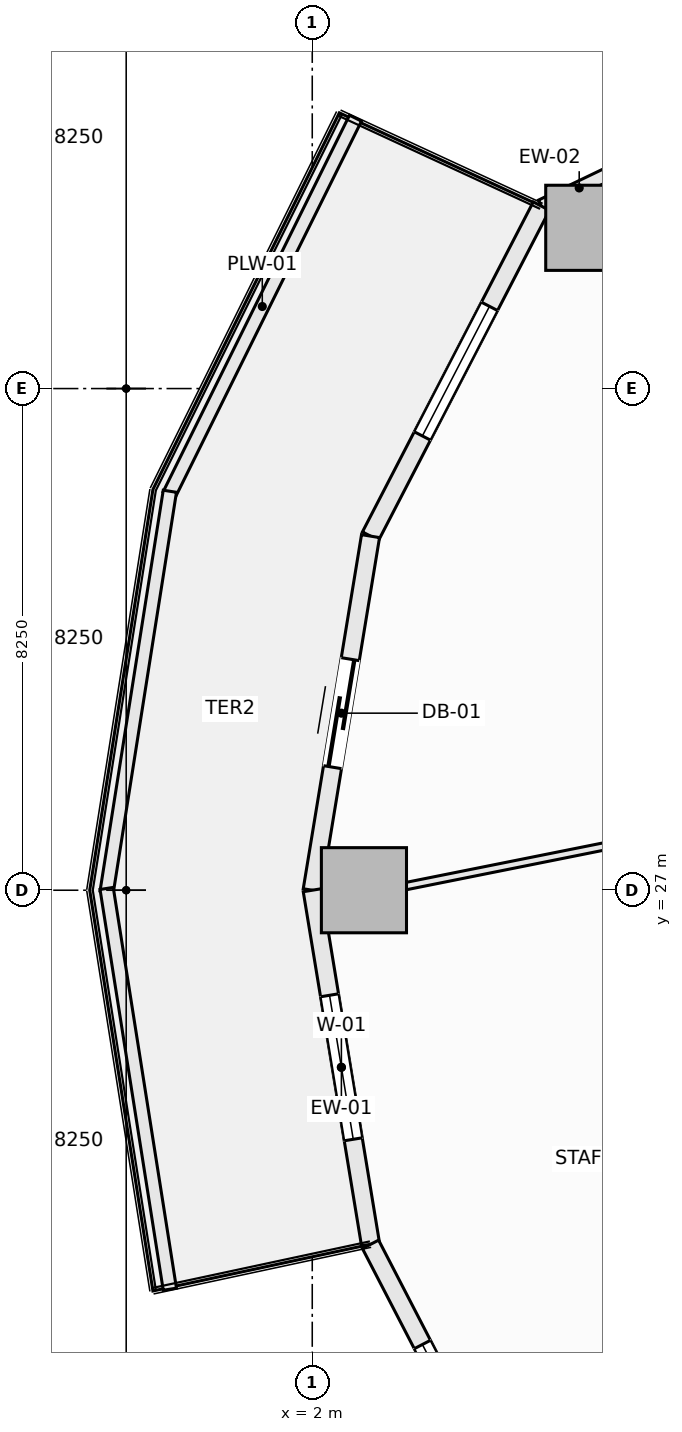
"""IFC4 building model, lengths in metres.
Left out: names, types, materials, properties, quantities, classifications, styles, units other than length and angle.
Written with IfcOpenShell. Run it as: python <this file> out.ifc"""

import sys

from ifc_helpers import new_model, si_unit, direction, frame, frame_2d, origin, origin_2d, place, context, subcontext, project, spatial, rectangle, extrude, element, fill, save


model = new_model("IFC4")
c1 = context("Model", 3, precision=1e-05, world=origin(), true_north=direction((0.0, 1.0)))
c2 = subcontext(c1, "Body", "Model", "MODEL_VIEW")
j1 = project(units=[si_unit("LENGTHUNIT", "METRE"), si_unit("PLANEANGLEUNIT", "RADIAN")], contexts=[c1])
p1 = place(None, origin())
s1 = spatial("IfcSite", under=j1, at=p1, CompositionType="ELEMENT")
p2 = place(p1, origin())
s2 = spatial("IfcBuilding", under=s1, at=p2, CompositionType="ELEMENT")
p3 = place(p2, frame((0.0, 0.0, 45.75)))
s3 = spatial("IfcBuildingStorey", under=s2, at=p3, CompositionType="ELEMENT", Elevation=45.75)
for number, where, z_axis, x_axis in (
    (1, (6.54, 37.894, -0.28), (0.0, 0.0, 1.0), (1.0, 0.0, 0.0)),
    (2, (2.85, 27.0, -0.28), (0.0, 0.0, 1.0), (1.0, 0.0, 0.0)),
):
    element("IfcColumn", number, at=place(p3, frame(where, z_axis=z_axis, x_axis=x_axis)), inside=s3, PredefinedType="COLUMN", context=c2, shape_type="SweptSolid", body=[
        extrude(rectangle(XDim=1.4, YDim=1.4, at=origin_2d()), origin(), (0.0, 0.0, 1.0), 3.85),
    ])
p4 = place(p3, frame((5.768, 38.25, 0.0), z_axis=(0.0, 0.0, 1.0), x_axis=(0.90131879969, 0.433156347438, 0.0)))
e3 = element("IfcWall", 3, at=p4, inside=s3, PredefinedType="SOLIDWALL", context=c2, shape_type="SweptSolid", body=[
    extrude(rectangle(XDim=1.381, YDim=0.22, at=frame_2d((0.69, 0.0))), origin(), (0.0, 0.0, 1.0), 3.093),
])
p5 = place(p3, frame((2.958, 32.823, 0.0), z_axis=(0.0, 0.0, 1.0), x_axis=(0.459809804413, 0.88801742312, 0.0)))
e4 = element("IfcWall", 4, at=p5, inside=s3, PredefinedType="SOLIDWALL", context=c2, shape_type="SweptSolid", body=[
    extrude(rectangle(XDim=6.111, YDim=0.3, at=frame_2d((3.055, 0.0))), origin(), (0.0, 0.0, 1.0), 3.093),
])
p6 = place(p5, frame((1.855, 0.0, 0.85)))
e5 = element("IfcOpeningElement", 5, at=p6, cuts=e4, PredefinedType="OPENING", context=c2, shape_type="SweptSolid", body=[
    extrude(rectangle(XDim=2.4, YDim=1.9, at=frame_2d((1.2, 0.95))), frame((0.0, 0.16, 0.0), z_axis=(0.0, -1.0, 0.0), x_axis=(1.0, 0.0, 0.0)), (0.0, 0.0, 1.0), 0.32),
])
p7 = place(p3, frame((2.0, 27.0, 0.0), z_axis=(0.0, 0.0, 1.0), x_axis=(0.162366057843, 0.98673059305, 0.0)))
e6 = element("IfcWall", 6, at=p7, inside=s3, PredefinedType="SOLIDWALL", context=c2, shape_type="SweptSolid", body=[
    extrude(rectangle(XDim=5.902, YDim=0.3, at=frame_2d((2.951, 0.0))), origin(), (0.0, 0.0, 1.0), 3.093),
])
p8 = place(p7, frame((2.051, 0.0, 0.0)))
e7 = element("IfcOpeningElement", 7, at=p8, cuts=e6, PredefinedType="OPENING", context=c2, shape_type="SweptSolid", body=[
    extrude(rectangle(XDim=1.8, YDim=2.25, at=frame_2d((0.9, 1.125))), frame((0.0, 0.16, 0.0), z_axis=(0.0, -1.0, 0.0), x_axis=(1.0, 0.0, 0.0)), (0.0, 0.0, 1.0), 0.32),
])
p9 = place(p3, frame((2.0, 27.0, 0.0), z_axis=(0.0, 0.0, 1.0), x_axis=(0.162366057843, -0.98673059305, 0.0)))
e8 = element("IfcWall", 8, at=p9, inside=s3, PredefinedType="SOLIDWALL", context=c2, shape_type="SweptSolid", body=[
    extrude(rectangle(XDim=5.902, YDim=0.3, at=frame_2d((2.951, 0.0))), origin(), (0.0, 0.0, 1.0), 3.093),
])
p10 = place(p9, frame((1.751, 0.0, 0.85)))
e9 = element("IfcOpeningElement", 9, at=p10, cuts=e8, PredefinedType="OPENING", context=c2, shape_type="SweptSolid", body=[
    extrude(rectangle(XDim=2.4, YDim=1.9, at=frame_2d((1.2, 0.95))), frame((0.0, 0.16, 0.0), z_axis=(0.0, -1.0, 0.0), x_axis=(1.0, 0.0, 0.0)), (0.0, 0.0, 1.0), 0.32),
])
p11 = place(p3, frame((2.958, 21.177, 0.0), z_axis=(0.0, 0.0, 1.0), x_axis=(0.459809804413, -0.88801742312, 0.0)))
e10 = element("IfcWall", 10, at=p11, inside=s3, PredefinedType="SOLIDWALL", context=c2, shape_type="SweptSolid", body=[
    extrude(rectangle(XDim=6.111, YDim=0.3, at=frame_2d((3.055, 0.0))), origin(), (0.0, 0.0, 1.0), 3.093),
])
p12 = place(p11, frame((1.855, 0.0, 0.85)))
e11 = element("IfcOpeningElement", 11, at=p12, cuts=e10, PredefinedType="OPENING", context=c2, shape_type="SweptSolid", body=[
    extrude(rectangle(XDim=2.4, YDim=1.9, at=frame_2d((1.2, 0.95))), frame((0.0, 0.16, 0.0), z_axis=(0.0, -1.0, 0.0), x_axis=(1.0, 0.0, 0.0)), (0.0, 0.0, 1.0), 0.32),
])
p13 = place(p3, frame((-0.354, 33.502, 0.0), z_axis=(0.0, 0.0, 1.0), x_axis=(0.443578479433, 0.8962355341, 0.0)))
e12 = element("IfcWall", 12, at=p13, inside=s3, PredefinedType="PARAPET", context=c2, shape_type="SweptSolid", body=[
    extrude(rectangle(XDim=6.911, YDim=0.22, at=frame_2d((3.456, 0.0))), origin(), (0.0, 0.0, 1.0), 0.52),
])
for number, where, z_axis, x_axis in (
    (13, (-1.382, 26.971, 0.0), (0.0, 0.0, 1.0), (0.156, 0.988, 0.0)),
    (14, (-1.382, 27.029, 0.0), (0.0, 0.0, 1.0), (0.156, -0.988, 0.0)),
):
    element("IfcWall", number, at=place(p3, frame(where, z_axis=z_axis, x_axis=x_axis)), inside=s3, PredefinedType="PARAPET", context=c2, shape_type="SweptSolid", body=[
        extrude(rectangle(XDim=6.672, YDim=0.22, at=frame_2d((3.336, 0.0))), origin(), (0.0, 0.0, 1.0), 0.52),
    ])
p14 = place(p3, frame((2.188, 26.796, 0.0), z_axis=(0.0, 0.0, 1.0), x_axis=(0.980506966672, 0.196484320768, 0.0)))
e15 = element("IfcWall", 15, at=p14, inside=s3, PredefinedType="PARTITIONING", context=c2, shape_type="SweptSolid", body=[
    extrude(rectangle(XDim=11.476, YDim=0.12, at=frame_2d((5.738, 0.0))), origin(), (0.0, 0.0, 1.0), 2.934),
])
p15 = place(p6, origin())
e16 = element("IfcWindow", 16, at=p15, inside=s3, PartitioningType="SINGLE_PANEL", PredefinedType="WINDOW", context=c2, shape_type="SweptSolid", body=[
    extrude(rectangle(XDim=2.4, YDim=1.9, at=frame_2d((1.2, 0.95))), frame((0.0, 0.03, 0.0), z_axis=(0.0, -1.0, 0.0), x_axis=(1.0, 0.0, 0.0)), (0.0, 0.0, 1.0), 0.06),
])
fill(e5, e16)
p16 = place(p8, origin())
e17 = element("IfcDoor", 17, at=p16, inside=s3, OperationType="SLIDING_TO_LEFT", PredefinedType="DOOR", context=c2, shape_type="SweptSolid", body=[
    extrude(rectangle(XDim=1.8, YDim=2.25, at=frame_2d((0.9, 1.125))), frame((0.0, 0.025, 0.0), z_axis=(0.0, -1.0, 0.0), x_axis=(1.0, 0.0, 0.0)), (0.0, 0.0, 1.0), 0.05),
])
fill(e7, e17)
p17 = place(p10, origin())
e18 = element("IfcWindow", 18, at=p17, inside=s3, PartitioningType="SINGLE_PANEL", PredefinedType="WINDOW", context=c2, shape_type="SweptSolid", body=[
    extrude(rectangle(XDim=2.4, YDim=1.9, at=frame_2d((1.2, 0.95))), frame((0.0, 0.03, 0.0), z_axis=(0.0, -1.0, 0.0), x_axis=(1.0, 0.0, 0.0)), (0.0, 0.0, 1.0), 0.06),
])
fill(e9, e18)
p18 = place(p12, origin())
e19 = element("IfcWindow", 19, at=p18, inside=s3, PartitioningType="SINGLE_PANEL", PredefinedType="WINDOW", context=c2, shape_type="SweptSolid", body=[
    extrude(rectangle(XDim=2.4, YDim=1.9, at=frame_2d((1.2, 0.95))), frame((0.0, 0.03, 0.0), z_axis=(0.0, -1.0, 0.0), x_axis=(1.0, 0.0, 0.0)), (0.0, 0.0, 1.0), 0.06),
])
fill(e11, e19)
save(model, sys.argv[1])
